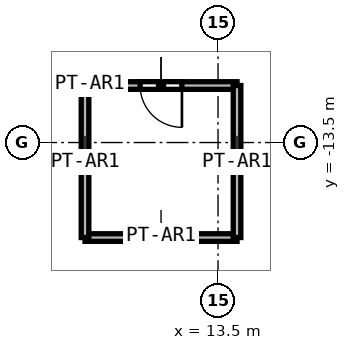
"""IFC4 building model, lengths in metres.
Left out: names, types, materials, properties, quantities, classifications, styles, units other than length and angle.
Written with IfcOpenShell. Run it as: python <this file> out.ifc"""

import sys

from ifc_helpers import new_model, si_unit, direction, frame, frame_2d, origin, place, context, subcontext, project, spatial, rectangle, extrude, element, fill, save


model = new_model("IFC4")
c1 = context("Model", 3, precision=1e-05, world=origin(), true_north=direction((0.0, 1.0)))
c2 = subcontext(c1, "Body", "Model", "MODEL_VIEW")
j1 = project(units=[si_unit("LENGTHUNIT", "METRE"), si_unit("PLANEANGLEUNIT", "RADIAN")], contexts=[c1])
p1 = place(None, origin())
s1 = spatial("IfcSite", under=j1, at=p1, CompositionType="ELEMENT")
p2 = place(p1, origin())
s2 = spatial("IfcBuilding", under=s1, at=p2, CompositionType="ELEMENT")
p3 = place(p2, origin())
s3 = spatial("IfcBuildingStorey", under=s2, at=p3, CompositionType="ELEMENT", Elevation=0.0)
p4 = place(p3, frame((10.0, -16.0, 0.0), z_axis=(0.0, 0.0, 1.0), x_axis=(1.0, 0.0, 0.0)))
e1 = element("IfcWall", 1, at=p4, inside=s3, PredefinedType="PARTITIONING", context=c2, shape_type="SweptSolid", body=[
    extrude(rectangle(XDim=4.0, YDim=0.2, at=frame_2d((2.0, 0.0))), origin(), (0.0, 0.0, 1.0), 11.7),
])
p5 = place(p3, frame((14.0, -12.0, 0.0), z_axis=(0.0, 0.0, 1.0), x_axis=(-1.0, 0.0, 0.0)))
e2 = element("IfcWall", 2, at=p5, inside=s3, PredefinedType="PARTITIONING", context=c2, shape_type="SweptSolid", body=[
    extrude(rectangle(XDim=4.0, YDim=0.2, at=frame_2d((2.0, 0.0))), origin(), (0.0, 0.0, 1.0), 11.7),
])
p6 = place(p5, frame((1.45, 0.0, 0.0)))
e3 = element("IfcOpeningElement", 3, at=p6, cuts=e2, PredefinedType="OPENING", context=c2, shape_type="SweptSolid", body=[
    extrude(rectangle(XDim=1.1, YDim=2.4, at=frame_2d((0.55, 1.2))), frame((0.0, 0.1, 0.0), z_axis=(0.0, -1.0, 0.0), x_axis=(1.0, 0.0, 0.0)), (0.0, 0.0, 1.0), 0.2),
])
for number, where, z_axis, x_axis in (
    (4, (10.0, -12.0, 0.0), (0.0, 0.0, 1.0), (0.0, -1.0, 0.0)),
    (5, (14.0, -16.0, 0.0), (0.0, 0.0, 1.0), (0.0, 1.0, 0.0)),
):
    element("IfcWall", number, at=place(p3, frame(where, z_axis=z_axis, x_axis=x_axis)), inside=s3, PredefinedType="PARTITIONING", context=c2, shape_type="SweptSolid", body=[
        extrude(rectangle(XDim=4.0, YDim=0.2, at=frame_2d((2.0, 0.0))), origin(), (0.0, 0.0, 1.0), 11.7),
    ])
p7 = place(p6, origin())
e6 = element("IfcDoor", 6, at=p7, inside=s3, OperationType="DOUBLE_DOOR_SINGLE_SWING", PredefinedType="DOOR", context=c2, shape_type="SweptSolid", body=[
    extrude(rectangle(XDim=1.1, YDim=2.4, at=frame_2d((0.55, 1.2))), frame((0.0, 0.025, 0.0), z_axis=(0.0, -1.0, 0.0), x_axis=(1.0, 0.0, 0.0)), (0.0, 0.0, 1.0), 0.05),
])
fill(e3, e6)
save(model, sys.argv[1])
